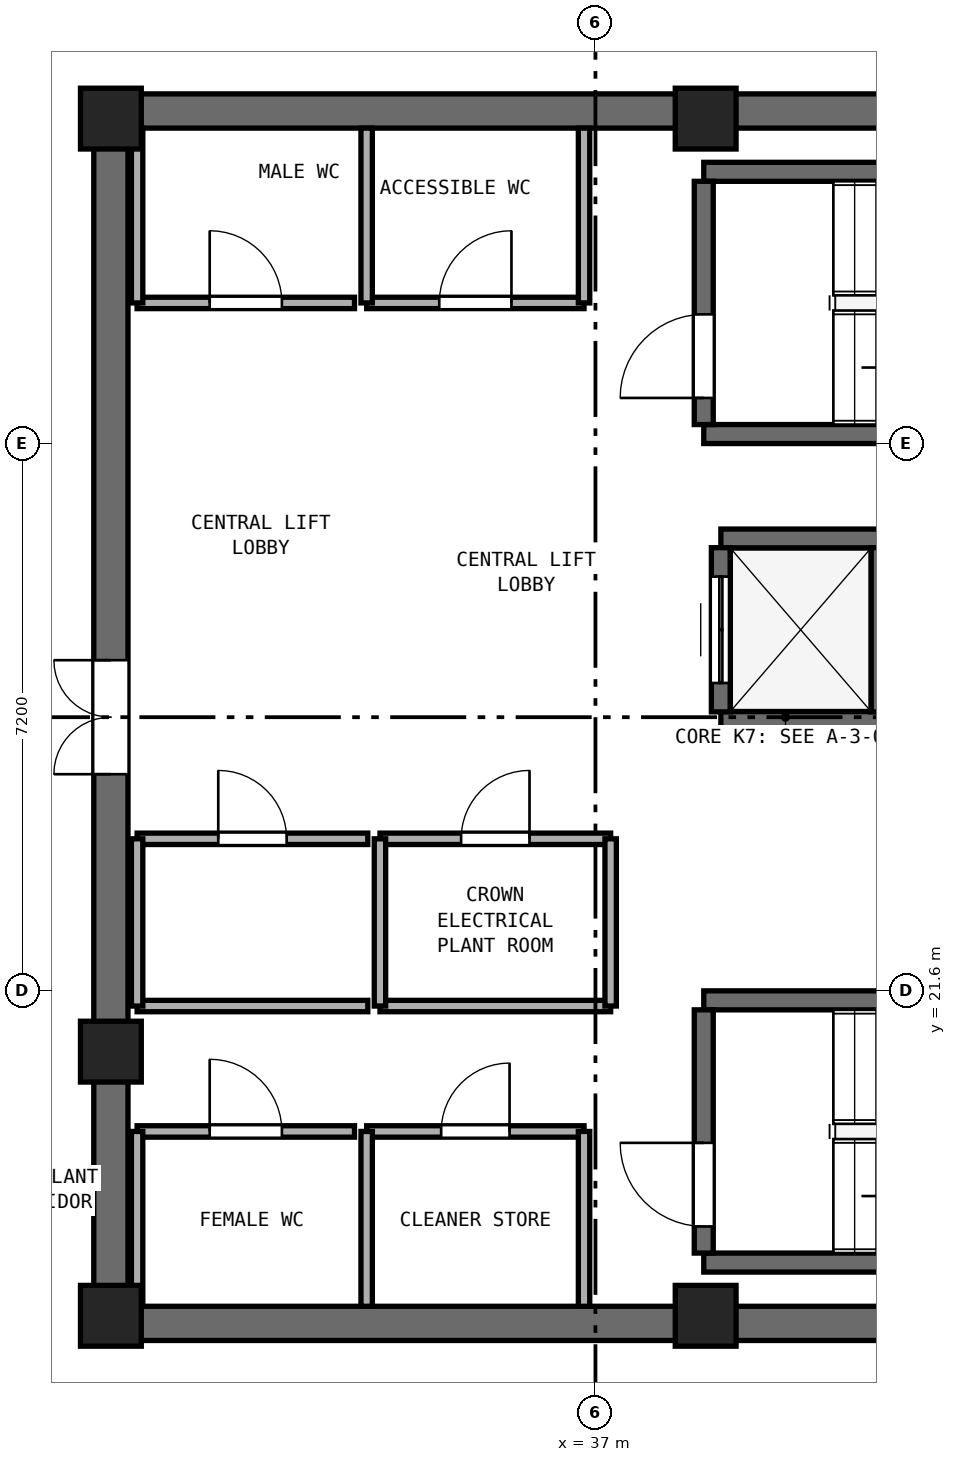
"""IFC4 building model, lengths in metres.
Left out: names, types, materials, properties, quantities, classifications, styles, units other than length and angle.
Written with IfcOpenShell. Run it as: python <this file> out.ifc"""

import sys

from ifc_helpers import new_model, si_unit, direction, frame, frame_2d, origin, origin_2d, place, context, subcontext, project, spatial, rectangle, extrude, element, fill, save


model = new_model("IFC4")
c1 = context("Model", 3, precision=1e-05, world=origin(), true_north=direction((0.0, 1.0)))
c2 = subcontext(c1, "Body", "Model", "MODEL_VIEW")
j1 = project(units=[si_unit("LENGTHUNIT", "METRE"), si_unit("PLANEANGLEUNIT", "RADIAN")], contexts=[c1])
p1 = place(None, origin())
s1 = spatial("IfcSite", under=j1, at=p1, CompositionType="ELEMENT")
p2 = place(p1, origin())
s2 = spatial("IfcBuilding", under=s1, at=p2, CompositionType="ELEMENT")
p3 = place(p2, frame((0.0, 0.0, 317.4)))
s3 = spatial("IfcBuildingStorey", under=s2, at=p3, CompositionType="ELEMENT", Elevation=317.4)
for number, where, z_axis, x_axis in (
    (1, (30.4, 17.225, 0.0), (0.0, 0.0, 1.0), (1.0, 0.0, 0.0)),
    (2, (30.4, 33.175, 0.0), (0.0, 0.0, 1.0), (1.0, 0.0, 0.0)),
):
    element("IfcWall", number, at=place(p3, frame(where, z_axis=z_axis, x_axis=x_axis)), inside=s3, PredefinedType="SHEAR", context=c2, shape_type="SweptSolid", body=[
        extrude(rectangle(XDim=18.2, YDim=0.45, at=frame_2d((9.1, 0.0))), origin(), (0.0, 0.0, 1.0), 3.72),
    ])
p4 = place(p3, frame((30.625, 17.45, 0.0), z_axis=(0.0, 0.0, 1.0), x_axis=(0.0, 1.0, 0.0)))
e3 = element("IfcWall", 3, at=p4, inside=s3, PredefinedType="SHEAR", context=c2, shape_type="SweptSolid", body=[
    extrude(rectangle(XDim=15.5, YDim=0.45, at=frame_2d((7.75, 0.0))), origin(), (0.0, 0.0, 1.0), 3.72),
])
p5 = place(p4, frame((7.0, 0.0, 0.0)))
e4 = element("IfcOpeningElement", 4, at=p5, cuts=e3, PredefinedType="OPENING", context=c2, shape_type="SweptSolid", body=[
    extrude(rectangle(XDim=1.5, YDim=2.15, at=frame_2d((0.75, 1.075))), frame((0.0, 0.235, 0.0), z_axis=(0.0, -1.0, 0.0), x_axis=(1.0, 0.0, 0.0)), (0.0, 0.0, 1.0), 0.47),
])
for number, where, z_axis, x_axis in (
    (5, (30.625, 17.325, 0.0), (0.0, 0.0, 1.0), (1.0, 0.0, 0.0)),
    (6, (38.45, 17.325, 0.0), (0.0, 0.0, 1.0), (1.0, 0.0, 0.0)),
    (7, (38.45, 33.075, 0.0), (0.0, 0.0, 1.0), (1.0, 0.0, 0.0)),
    (8, (30.625, 33.075, 0.0), (0.0, 0.0, 1.0), (1.0, 0.0, 0.0)),
    (9, (30.625, 20.8, 0.0), (0.0, 0.0, 1.0), (1.0, 0.0, 0.0)),
):
    element("IfcColumn", number, at=place(p3, frame(where, z_axis=z_axis, x_axis=x_axis)), inside=s3, PredefinedType="PILASTER", context=c2, shape_type="SweptSolid", body=[
        extrude(rectangle(XDim=0.8, YDim=0.8, at=origin_2d()), origin(), (0.0, 0.0, 1.0), 4.0),
    ])
for number, where, z_axis, x_axis in (
    (10, (38.425, 28.925, 0.0), (0.0, 0.0, 1.0), (1.0, 0.0, 0.0)),
    (11, (38.425, 32.375, 0.0), (0.0, 0.0, 1.0), (1.0, 0.0, 0.0)),
):
    element("IfcWall", number, at=place(p3, frame(where, z_axis=z_axis, x_axis=x_axis)), inside=s3, PredefinedType="SHEAR", context=c2, shape_type="SweptSolid", body=[
        extrude(rectangle(XDim=7.3, YDim=0.25, at=frame_2d((3.65, 0.0))), origin(), (0.0, 0.0, 1.0), 3.72),
    ])
p6 = place(p3, frame((38.425, 29.05, 0.0), z_axis=(0.0, 0.0, 1.0), x_axis=(0.0, 1.0, 0.0)))
e12 = element("IfcWall", 12, at=p6, inside=s3, PredefinedType="SHEAR", context=c2, shape_type="SweptSolid", body=[
    extrude(rectangle(XDim=3.2, YDim=0.25, at=frame_2d((1.6, 0.0))), origin(), (0.0, 0.0, 1.0), 3.72),
])
p7 = place(p6, frame((0.35, 0.0, 0.0)))
e13 = element("IfcOpeningElement", 13, at=p7, cuts=e12, PredefinedType="OPENING", context=c2, shape_type="SweptSolid", body=[
    extrude(rectangle(XDim=1.1, YDim=2.15, at=frame_2d((0.55, 1.075))), frame((0.0, 0.135, 0.0), z_axis=(0.0, -1.0, 0.0), x_axis=(1.0, 0.0, 0.0)), (0.0, 0.0, 1.0), 0.27),
])
for number, where, z_axis, x_axis in (
    (14, (38.425, 18.025, 0.0), (0.0, 0.0, 1.0), (1.0, 0.0, 0.0)),
    (15, (38.425, 21.475, 0.0), (0.0, 0.0, 1.0), (1.0, 0.0, 0.0)),
):
    element("IfcWall", number, at=place(p3, frame(where, z_axis=z_axis, x_axis=x_axis)), inside=s3, PredefinedType="SHEAR", context=c2, shape_type="SweptSolid", body=[
        extrude(rectangle(XDim=7.3, YDim=0.25, at=frame_2d((3.65, 0.0))), origin(), (0.0, 0.0, 1.0), 3.72),
    ])
p8 = place(p3, frame((38.425, 18.15, 0.0), z_axis=(0.0, 0.0, 1.0), x_axis=(0.0, 1.0, 0.0)))
e16 = element("IfcWall", 16, at=p8, inside=s3, PredefinedType="SHEAR", context=c2, shape_type="SweptSolid", body=[
    extrude(rectangle(XDim=3.2, YDim=0.25, at=frame_2d((1.6, 0.0))), origin(), (0.0, 0.0, 1.0), 3.72),
])
p9 = place(p8, frame((0.35, 0.0, 0.0)))
e17 = element("IfcOpeningElement", 17, at=p9, cuts=e16, PredefinedType="OPENING", context=c2, shape_type="SweptSolid", body=[
    extrude(rectangle(XDim=1.1, YDim=2.15, at=frame_2d((0.55, 1.075))), frame((0.0, 0.135, 0.0), z_axis=(0.0, -1.0, 0.0), x_axis=(1.0, 0.0, 0.0)), (0.0, 0.0, 1.0), 0.27),
])
for number, where, z_axis, x_axis in (
    (18, (38.65, 25.15, 0.0), (0.0, 0.0, 1.0), (1.0, 0.0, 0.0)),
    (19, (38.65, 27.55, 0.0), (0.0, 0.0, 1.0), (1.0, 0.0, 0.0)),
):
    element("IfcWall", number, at=place(p3, frame(where, z_axis=z_axis, x_axis=x_axis)), inside=s3, PredefinedType="SHEAR", context=c2, shape_type="SweptSolid", body=[
        extrude(rectangle(XDim=2.1, YDim=0.25, at=frame_2d((1.05, 0.0))), origin(), (0.0, 0.0, 1.0), 3.72),
    ])
p10 = place(p3, frame((38.65, 25.27, 0.0), z_axis=(0.0, 0.0, 1.0), x_axis=(0.0, 1.0, 0.0)))
e20 = element("IfcWall", 20, at=p10, inside=s3, PredefinedType="SHEAR", context=c2, shape_type="SweptSolid", body=[
    extrude(rectangle(XDim=2.16, YDim=0.25, at=frame_2d((1.08, 0.0))), origin(), (0.0, 0.0, 1.0), 3.72),
])
p11 = place(p10, frame((0.38, 0.0, 0.0)))
e21 = element("IfcOpeningElement", 21, at=p11, cuts=e20, PredefinedType="OPENING", context=c2, shape_type="SweptSolid", body=[
    extrude(rectangle(XDim=1.4, YDim=2.2, at=frame_2d((0.7, 1.1))), frame((0.0, 0.135, 0.0), z_axis=(0.0, -1.0, 0.0), x_axis=(1.0, 0.0, 0.0)), (0.0, 0.0, 1.0), 0.27),
])
p12 = place(p3, frame((40.75, 25.27, 0.0), z_axis=(0.0, 0.0, 1.0), x_axis=(0.0, 1.0, 0.0)))
e22 = element("IfcWall", 22, at=p12, inside=s3, PredefinedType="SHEAR", context=c2, shape_type="SweptSolid", body=[
    extrude(rectangle(XDim=2.16, YDim=0.25, at=frame_2d((1.08, 0.0))), origin(), (0.0, 0.0, 1.0), 3.72),
])
p13 = place(p3, frame((30.97, 30.65, 0.0), z_axis=(0.0, 0.0, 1.0), x_axis=(1.0, 0.0, 0.0)))
e23 = element("IfcWall", 23, at=p13, inside=s3, PredefinedType="PARTITIONING", context=c2, shape_type="SweptSolid", body=[
    extrude(rectangle(XDim=2.86, YDim=0.15, at=frame_2d((1.43, 0.0))), origin(), (0.0, 0.0, 1.0), 3.72),
])
p14 = place(p13, frame((0.955, 0.0, 0.0)))
e24 = element("IfcOpeningElement", 24, at=p14, cuts=e23, PredefinedType="OPENING", context=c2, shape_type="SweptSolid", body=[
    extrude(rectangle(XDim=0.95, YDim=2.1, at=frame_2d((0.475, 1.05))), frame((0.0, 0.085, 0.0), z_axis=(0.0, -1.0, 0.0), x_axis=(1.0, 0.0, 0.0)), (0.0, 0.0, 1.0), 0.17),
])
p15 = place(p3, frame((30.97, 30.65, 0.0), z_axis=(0.0, 0.0, 1.0), x_axis=(0.0, 1.0, 0.0)))
e25 = element("IfcWall", 25, at=p15, inside=s3, PredefinedType="PARTITIONING", context=c2, shape_type="SweptSolid", body=[
    extrude(rectangle(XDim=2.3, YDim=0.15, at=frame_2d((1.15, 0.0))), origin(), (0.0, 0.0, 1.0), 2.82),
])
p16 = place(p3, frame((33.99, 30.65, 0.0), z_axis=(0.0, 0.0, 1.0), x_axis=(1.0, 0.0, 0.0)))
e26 = element("IfcWall", 26, at=p16, inside=s3, PredefinedType="PARTITIONING", context=c2, shape_type="SweptSolid", body=[
    extrude(rectangle(XDim=2.86, YDim=0.15, at=frame_2d((1.43, 0.0))), origin(), (0.0, 0.0, 1.0), 3.72),
])
p17 = place(p16, frame((0.955, 0.0, 0.0)))
e27 = element("IfcOpeningElement", 27, at=p17, cuts=e26, PredefinedType="OPENING", context=c2, shape_type="SweptSolid", body=[
    extrude(rectangle(XDim=0.95, YDim=2.1, at=frame_2d((0.475, 1.05))), frame((0.0, 0.085, 0.0), z_axis=(0.0, -1.0, 0.0), x_axis=(1.0, 0.0, 0.0)), (0.0, 0.0, 1.0), 0.17),
])
for number, where, z_axis, x_axis in (
    (28, (33.99, 30.65, 0.0), (0.0, 0.0, 1.0), (0.0, 1.0, 0.0)),
    (29, (36.85, 30.65, 0.0), (0.0, 0.0, 1.0), (0.0, 1.0, 0.0)),
):
    element("IfcWall", number, at=place(p3, frame(where, z_axis=z_axis, x_axis=x_axis)), inside=s3, PredefinedType="PARTITIONING", context=c2, shape_type="SweptSolid", body=[
        extrude(rectangle(XDim=2.3, YDim=0.15, at=frame_2d((1.15, 0.0))), origin(), (0.0, 0.0, 1.0), 3.72),
    ])
p18 = place(p3, frame((30.97, 19.75, 0.0), z_axis=(0.0, 0.0, 1.0), x_axis=(1.0, 0.0, 0.0)))
e30 = element("IfcWall", 30, at=p18, inside=s3, PredefinedType="PARTITIONING", context=c2, shape_type="SweptSolid", body=[
    extrude(rectangle(XDim=2.86, YDim=0.15, at=frame_2d((1.43, 0.0))), origin(), (0.0, 0.0, 1.0), 3.72),
])
p19 = place(p18, frame((0.955, 0.0, 0.0)))
e31 = element("IfcOpeningElement", 31, at=p19, cuts=e30, PredefinedType="OPENING", context=c2, shape_type="SweptSolid", body=[
    extrude(rectangle(XDim=0.95, YDim=2.1, at=frame_2d((0.475, 1.05))), frame((0.0, 0.085, 0.0), z_axis=(0.0, -1.0, 0.0), x_axis=(1.0, 0.0, 0.0)), (0.0, 0.0, 1.0), 0.17),
])
p20 = place(p3, frame((30.97, 17.45, 0.0), z_axis=(0.0, 0.0, 1.0), x_axis=(0.0, 1.0, 0.0)))
e32 = element("IfcWall", 32, at=p20, inside=s3, PredefinedType="PARTITIONING", context=c2, shape_type="SweptSolid", body=[
    extrude(rectangle(XDim=2.3, YDim=0.15, at=frame_2d((1.15, 0.0))), origin(), (0.0, 0.0, 1.0), 2.82),
])
p21 = place(p3, frame((33.99, 19.75, 0.0), z_axis=(0.0, 0.0, 1.0), x_axis=(1.0, 0.0, 0.0)))
e33 = element("IfcWall", 33, at=p21, inside=s3, PredefinedType="PARTITIONING", context=c2, shape_type="SweptSolid", body=[
    extrude(rectangle(XDim=2.86, YDim=0.15, at=frame_2d((1.43, 0.0))), origin(), (0.0, 0.0, 1.0), 3.72),
])
p22 = place(p21, frame((0.98, 0.0, 0.0)))
e34 = element("IfcOpeningElement", 34, at=p22, cuts=e33, PredefinedType="OPENING", context=c2, shape_type="SweptSolid", body=[
    extrude(rectangle(XDim=0.9, YDim=2.1, at=frame_2d((0.45, 1.05))), frame((0.0, 0.085, 0.0), z_axis=(0.0, -1.0, 0.0), x_axis=(1.0, 0.0, 0.0)), (0.0, 0.0, 1.0), 0.17),
])
for number, where, z_axis, x_axis in (
    (35, (33.99, 17.45, 0.0), (0.0, 0.0, 1.0), (0.0, 1.0, 0.0)),
    (36, (36.85, 17.45, 0.0), (0.0, 0.0, 1.0), (0.0, 1.0, 0.0)),
):
    element("IfcWall", number, at=place(p3, frame(where, z_axis=z_axis, x_axis=x_axis)), inside=s3, PredefinedType="PARTITIONING", context=c2, shape_type="SweptSolid", body=[
        extrude(rectangle(XDim=2.3, YDim=0.15, at=frame_2d((1.15, 0.0))), origin(), (0.0, 0.0, 1.0), 3.72),
    ])
p23 = place(p3, frame((30.97, 21.4, 0.0), z_axis=(0.0, 0.0, 1.0), x_axis=(1.0, 0.0, 0.0)))
e37 = element("IfcWall", 37, at=p23, inside=s3, PredefinedType="PARTITIONING", context=c2, shape_type="SweptSolid", body=[
    extrude(rectangle(XDim=3.035, YDim=0.15, at=frame_2d((1.518, 0.0))), origin(), (0.0, 0.0, 1.0), 3.72),
])
p24 = place(p3, frame((30.97, 23.6, 0.0), z_axis=(0.0, 0.0, 1.0), x_axis=(1.0, 0.0, 0.0)))
e38 = element("IfcWall", 38, at=p24, inside=s3, PredefinedType="PARTITIONING", context=c2, shape_type="SweptSolid", body=[
    extrude(rectangle(XDim=3.035, YDim=0.15, at=frame_2d((1.518, 0.0))), origin(), (0.0, 0.0, 1.0), 3.72),
])
p25 = place(p24, frame((1.067, 0.0, 0.0)))
e39 = element("IfcOpeningElement", 39, at=p25, cuts=e38, PredefinedType="OPENING", context=c2, shape_type="SweptSolid", body=[
    extrude(rectangle(XDim=0.9, YDim=2.1, at=frame_2d((0.45, 1.05))), frame((0.0, 0.085, 0.0), z_axis=(0.0, -1.0, 0.0), x_axis=(1.0, 0.0, 0.0)), (0.0, 0.0, 1.0), 0.17),
])
p26 = place(p3, frame((30.97, 21.4, 0.0), z_axis=(0.0, 0.0, 1.0), x_axis=(0.0, 1.0, 0.0)))
e40 = element("IfcWall", 40, at=p26, inside=s3, PredefinedType="PARTITIONING", context=c2, shape_type="SweptSolid", body=[
    extrude(rectangle(XDim=2.2, YDim=0.15, at=frame_2d((1.1, 0.0))), origin(), (0.0, 0.0, 1.0), 2.82),
])
p27 = place(p3, frame((34.165, 21.4, 0.0), z_axis=(0.0, 0.0, 1.0), x_axis=(1.0, 0.0, 0.0)))
e41 = element("IfcWall", 41, at=p27, inside=s3, PredefinedType="PARTITIONING", context=c2, shape_type="SweptSolid", body=[
    extrude(rectangle(XDim=3.035, YDim=0.15, at=frame_2d((1.518, 0.0))), origin(), (0.0, 0.0, 1.0), 3.72),
])
p28 = place(p3, frame((34.165, 23.6, 0.0), z_axis=(0.0, 0.0, 1.0), x_axis=(1.0, 0.0, 0.0)))
e42 = element("IfcWall", 42, at=p28, inside=s3, PredefinedType="PARTITIONING", context=c2, shape_type="SweptSolid", body=[
    extrude(rectangle(XDim=3.035, YDim=0.15, at=frame_2d((1.518, 0.0))), origin(), (0.0, 0.0, 1.0), 3.72),
])
p29 = place(p28, frame((1.067, 0.0, 0.0)))
e43 = element("IfcOpeningElement", 43, at=p29, cuts=e42, PredefinedType="OPENING", context=c2, shape_type="SweptSolid", body=[
    extrude(rectangle(XDim=0.9, YDim=2.1, at=frame_2d((0.45, 1.05))), frame((0.0, 0.085, 0.0), z_axis=(0.0, -1.0, 0.0), x_axis=(1.0, 0.0, 0.0)), (0.0, 0.0, 1.0), 0.17),
])
for number, where, z_axis, x_axis in (
    (44, (34.165, 21.4, 0.0), (0.0, 0.0, 1.0), (0.0, 1.0, 0.0)),
    (45, (37.2, 21.4, 0.0), (0.0, 0.0, 1.0), (0.0, 1.0, 0.0)),
):
    element("IfcWall", number, at=place(p3, frame(where, z_axis=z_axis, x_axis=x_axis)), inside=s3, PredefinedType="PARTITIONING", context=c2, shape_type="SweptSolid", body=[
        extrude(rectangle(XDim=2.2, YDim=0.15, at=frame_2d((1.1, 0.0))), origin(), (0.0, 0.0, 1.0), 3.72),
    ])
p30 = place(p7, origin())
e46 = element("IfcDoor", 46, at=p30, inside=s3, OperationType="SINGLE_SWING_LEFT", PredefinedType="DOOR", context=c2, shape_type="SweptSolid", body=[
    extrude(rectangle(XDim=1.1, YDim=2.15, at=frame_2d((0.55, 1.075))), frame((0.0, 0.025, 0.0), z_axis=(0.0, -1.0, 0.0), x_axis=(1.0, 0.0, 0.0)), (0.0, 0.0, 1.0), 0.05),
])
fill(e13, e46)
p31 = place(p9, origin())
e47 = element("IfcDoor", 47, at=p31, inside=s3, OperationType="SINGLE_SWING_RIGHT", PredefinedType="DOOR", context=c2, shape_type="SweptSolid", body=[
    extrude(rectangle(XDim=1.1, YDim=2.15, at=frame_2d((0.55, 1.075))), frame((0.0, 0.025, 0.0), z_axis=(0.0, -1.0, 0.0), x_axis=(1.0, 0.0, 0.0)), (0.0, 0.0, 1.0), 0.05),
])
fill(e17, e47)
p32 = place(p11, origin())
e48 = element("IfcDoor", 48, at=p32, inside=s3, OperationType="DOUBLE_DOOR_SLIDING", PredefinedType="DOOR", context=c2, shape_type="SweptSolid", body=[
    extrude(rectangle(XDim=1.4, YDim=2.2, at=frame_2d((0.7, 1.1))), frame((0.0, 0.025, 0.0), z_axis=(0.0, -1.0, 0.0), x_axis=(1.0, 0.0, 0.0)), (0.0, 0.0, 1.0), 0.05),
])
fill(e21, e48)
p33 = place(p5, origin())
e49 = element("IfcDoor", 49, at=p33, inside=s3, OperationType="DOUBLE_DOOR_SINGLE_SWING", PredefinedType="DOOR", context=c2, shape_type="SweptSolid", body=[
    extrude(rectangle(XDim=1.5, YDim=2.15, at=frame_2d((0.75, 1.075))), frame((0.0, 0.025, 0.0), z_axis=(0.0, -1.0, 0.0), x_axis=(1.0, 0.0, 0.0)), (0.0, 0.0, 1.0), 0.05),
])
fill(e4, e49)
p34 = place(p14, origin())
e50 = element("IfcDoor", 50, at=p34, inside=s3, OperationType="SINGLE_SWING_LEFT", PredefinedType="DOOR", context=c2, shape_type="SweptSolid", body=[
    extrude(rectangle(XDim=0.95, YDim=2.1, at=frame_2d((0.475, 1.05))), frame((0.0, 0.025, 0.0), z_axis=(0.0, -1.0, 0.0), x_axis=(1.0, 0.0, 0.0)), (0.0, 0.0, 1.0), 0.05),
])
fill(e24, e50)
p35 = place(p17, origin())
e51 = element("IfcDoor", 51, at=p35, inside=s3, OperationType="SINGLE_SWING_RIGHT", PredefinedType="DOOR", context=c2, shape_type="SweptSolid", body=[
    extrude(rectangle(XDim=0.95, YDim=2.1, at=frame_2d((0.475, 1.05))), frame((0.0, 0.025, 0.0), z_axis=(0.0, -1.0, 0.0), x_axis=(1.0, 0.0, 0.0)), (0.0, 0.0, 1.0), 0.05),
])
fill(e27, e51)
p36 = place(p19, origin())
e52 = element("IfcDoor", 52, at=p36, inside=s3, OperationType="SINGLE_SWING_LEFT", PredefinedType="DOOR", context=c2, shape_type="SweptSolid", body=[
    extrude(rectangle(XDim=0.95, YDim=2.1, at=frame_2d((0.475, 1.05))), frame((0.0, 0.025, 0.0), z_axis=(0.0, -1.0, 0.0), x_axis=(1.0, 0.0, 0.0)), (0.0, 0.0, 1.0), 0.05),
])
fill(e31, e52)
p37 = place(p22, origin())
e53 = element("IfcDoor", 53, at=p37, inside=s3, OperationType="SINGLE_SWING_RIGHT", PredefinedType="DOOR", context=c2, shape_type="SweptSolid", body=[
    extrude(rectangle(XDim=0.9, YDim=2.1, at=frame_2d((0.45, 1.05))), frame((0.0, 0.025, 0.0), z_axis=(0.0, -1.0, 0.0), x_axis=(1.0, 0.0, 0.0)), (0.0, 0.0, 1.0), 0.05),
])
fill(e34, e53)
p38 = place(p25, origin())
e54 = element("IfcDoor", 54, at=p38, inside=s3, OperationType="SINGLE_SWING_LEFT", PredefinedType="DOOR", context=c2, shape_type="SweptSolid", body=[
    extrude(rectangle(XDim=0.9, YDim=2.1, at=frame_2d((0.45, 1.05))), frame((0.0, 0.025, 0.0), z_axis=(0.0, -1.0, 0.0), x_axis=(1.0, 0.0, 0.0)), (0.0, 0.0, 1.0), 0.05),
])
fill(e39, e54)
p39 = place(p29, origin())
e55 = element("IfcDoor", 55, at=p39, inside=s3, OperationType="SINGLE_SWING_RIGHT", PredefinedType="DOOR", context=c2, shape_type="SweptSolid", body=[
    extrude(rectangle(XDim=0.9, YDim=2.1, at=frame_2d((0.45, 1.05))), frame((0.0, 0.025, 0.0), z_axis=(0.0, -1.0, 0.0), x_axis=(1.0, 0.0, 0.0)), (0.0, 0.0, 1.0), 0.05),
])
fill(e43, e55)
save(model, sys.argv[1])
